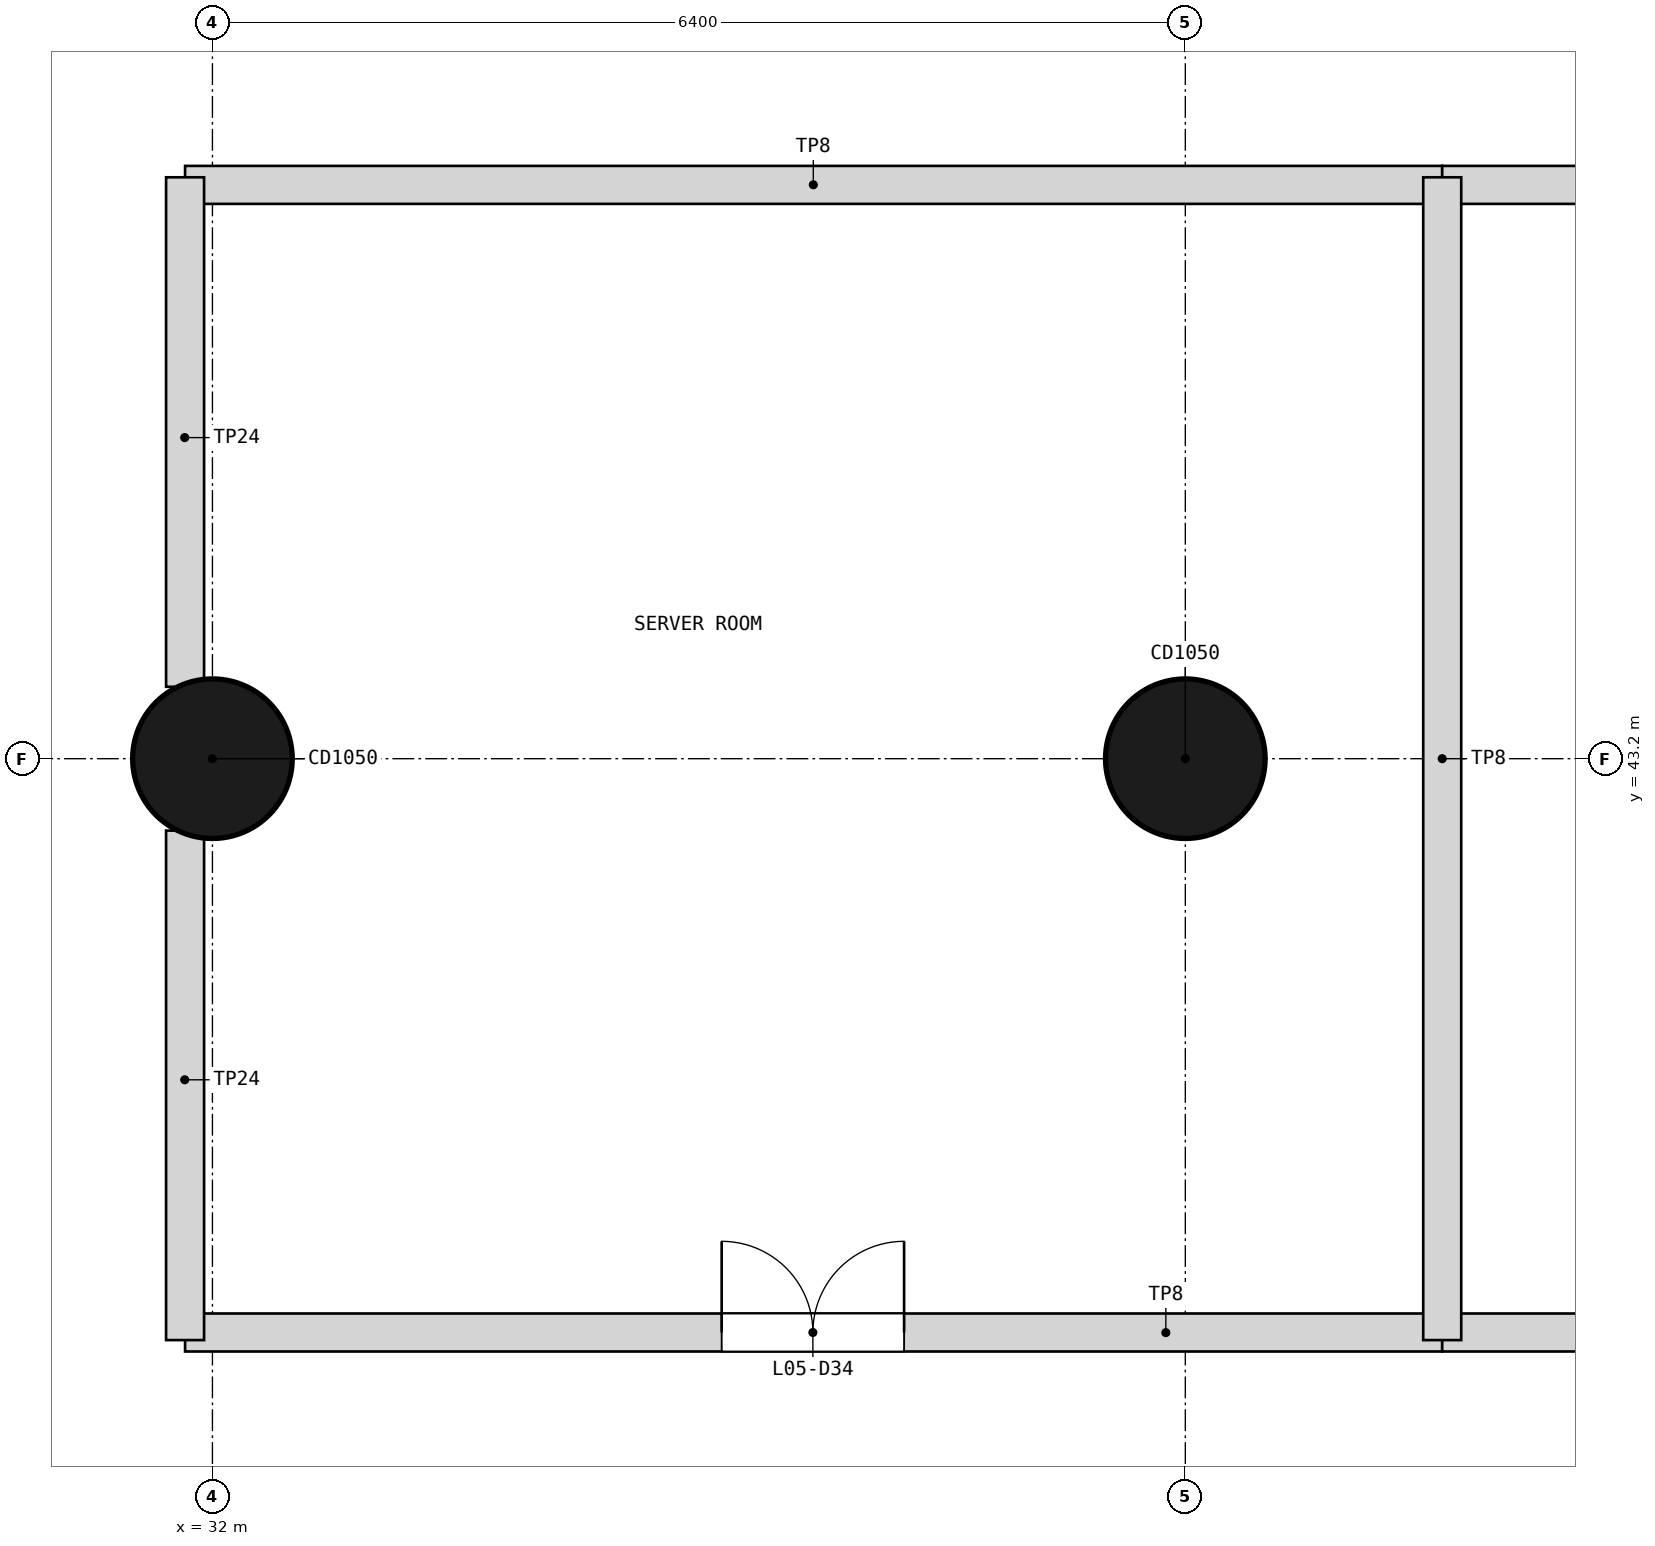
"""IFC4 building model, lengths in metres.
Left out: names, types, materials, properties, quantities, classifications, styles, units other than length and angle.
Written with IfcOpenShell. Run it as: python <this file> out.ifc"""

import sys

from ifc_helpers import new_model, si_unit, direction, frame, frame_2d, origin, origin_2d, place, context, subcontext, project, spatial, rectangle, circle, extrude, element, fill, save


model = new_model("IFC4")
c1 = context("Model", 3, precision=1e-05, world=origin(), true_north=direction((0.0, 1.0)))
c2 = subcontext(c1, "Body", "Model", "MODEL_VIEW")
j1 = project(units=[si_unit("LENGTHUNIT", "METRE"), si_unit("PLANEANGLEUNIT", "RADIAN")], contexts=[c1])
p1 = place(None, origin())
s1 = spatial("IfcSite", under=j1, at=p1, CompositionType="ELEMENT")
p2 = place(p1, origin())
s2 = spatial("IfcBuilding", under=s1, at=p2, CompositionType="ELEMENT")
p3 = place(p2, frame((0.0, 0.0, 21.0)))
s3 = spatial("IfcBuildingStorey", under=s2, at=p3, CompositionType="ELEMENT", Elevation=21.0)
for number, where, z_axis, x_axis in (
    (1, (32.0, 43.2, 0.0), (0.0, 0.0, 1.0), (1.0, 0.0, 0.0)),
    (2, (38.4, 43.2, 0.0), (0.0, 0.0, 1.0), (1.0, 0.0, 0.0)),
):
    element("IfcColumn", number, at=place(p3, frame(where, z_axis=z_axis, x_axis=x_axis)), inside=s3, PredefinedType="COLUMN", context=c2, shape_type="SweptSolid", body=[
        extrude(circle(Radius=0.525, at=origin_2d()), origin(), (0.0, 0.0, 1.0), 3.9),
    ])
p4 = place(p3, frame((31.82, 39.425, 0.0), z_axis=(0.0, 0.0, 1.0), x_axis=(1.0, 0.0, 0.0)))
e3 = element("IfcWall", 3, at=p4, inside=s3, PredefinedType="PARTITIONING", context=c2, shape_type="SweptSolid", body=[
    extrude(rectangle(XDim=8.27, YDim=0.25, at=frame_2d((4.135, 0.0))), origin(), (0.0, 0.0, 1.0), 3.68),
])
p5 = place(p4, frame((3.53, 0.0, 0.0)))
e4 = element("IfcOpeningElement", 4, at=p5, cuts=e3, PredefinedType="OPENING", context=c2, shape_type="SweptSolid", body=[
    extrude(rectangle(XDim=1.2, YDim=2.1, at=frame_2d((0.6, 1.05))), frame((0.0, 0.135, 0.0), z_axis=(0.0, -1.0, 0.0), x_axis=(1.0, 0.0, 0.0)), (0.0, 0.0, 1.0), 0.27),
])
p6 = place(p3, frame((31.82, 46.975, 0.0), z_axis=(0.0, 0.0, 1.0), x_axis=(1.0, 0.0, 0.0)))
e5 = element("IfcWall", 5, at=p6, inside=s3, PredefinedType="PARTITIONING", context=c2, shape_type="SweptSolid", body=[
    extrude(rectangle(XDim=8.27, YDim=0.25, at=frame_2d((4.135, 0.0))), origin(), (0.0, 0.0, 1.0), 3.68),
])
p7 = place(p3, frame((40.09, 39.425, 0.0), z_axis=(0.0, 0.0, 1.0), x_axis=(1.0, 0.0, 0.0)))
e6 = element("IfcWall", 6, at=p7, inside=s3, PredefinedType="PARTITIONING", context=c2, shape_type="SweptSolid", body=[
    extrude(rectangle(XDim=6.4, YDim=0.25, at=frame_2d((3.2, 0.0))), origin(), (0.0, 0.0, 1.0), 3.68),
])
p8 = place(p7, frame((2.61, 0.0, 0.0)))
e7 = element("IfcOpeningElement", 7, at=p8, cuts=e6, PredefinedType="OPENING", context=c2, shape_type="SweptSolid", body=[
    extrude(rectangle(XDim=1.2, YDim=2.1, at=frame_2d((0.6, 1.05))), frame((0.0, 0.135, 0.0), z_axis=(0.0, -1.0, 0.0), x_axis=(1.0, 0.0, 0.0)), (0.0, 0.0, 1.0), 0.27),
])
p9 = place(p3, frame((40.09, 46.975, 0.0), z_axis=(0.0, 0.0, 1.0), x_axis=(1.0, 0.0, 0.0)))
e8 = element("IfcWall", 8, at=p9, inside=s3, PredefinedType="PARTITIONING", context=c2, shape_type="SweptSolid", body=[
    extrude(rectangle(XDim=6.4, YDim=0.25, at=frame_2d((3.2, 0.0))), origin(), (0.0, 0.0, 1.0), 3.68),
])
p10 = place(p3, frame((40.09, 39.375, 0.0), z_axis=(0.0, 0.0, 1.0), x_axis=(0.0, 1.0, 0.0)))
e9 = element("IfcWall", 9, at=p10, inside=s3, PredefinedType="PARTITIONING", context=c2, shape_type="SweptSolid", body=[
    extrude(rectangle(XDim=7.65, YDim=0.25, at=frame_2d((3.825, 0.0))), origin(), (0.0, 0.0, 1.0), 3.68),
])
for number, where, z_axis, x_axis in (
    (10, (31.82, 39.375, 0.0), (0.0, 0.0, 1.0), (0.0, 1.0, 0.0)),
    (11, (31.82, 43.673, 0.0), (0.0, 0.0, 1.0), (0.0, 1.0, 0.0)),
):
    element("IfcWall", number, at=place(p3, frame(where, z_axis=z_axis, x_axis=x_axis)), inside=s3, PredefinedType="PARTITIONING", context=c2, shape_type="SweptSolid", body=[
        extrude(rectangle(XDim=3.352, YDim=0.25, at=frame_2d((1.676, 0.0))), origin(), (0.0, 0.0, 1.0), 2.78),
    ])
p11 = place(p5, origin())
e12 = element("IfcDoor", 12, at=p11, inside=s3, OperationType="DOUBLE_DOOR_SINGLE_SWING", PredefinedType="DOOR", context=c2, shape_type="SweptSolid", body=[
    extrude(rectangle(XDim=1.2, YDim=2.1, at=frame_2d((0.6, 1.05))), frame((0.0, 0.025, 0.0), z_axis=(0.0, -1.0, 0.0), x_axis=(1.0, 0.0, 0.0)), (0.0, 0.0, 1.0), 0.05),
])
fill(e4, e12)
save(model, sys.argv[1])
